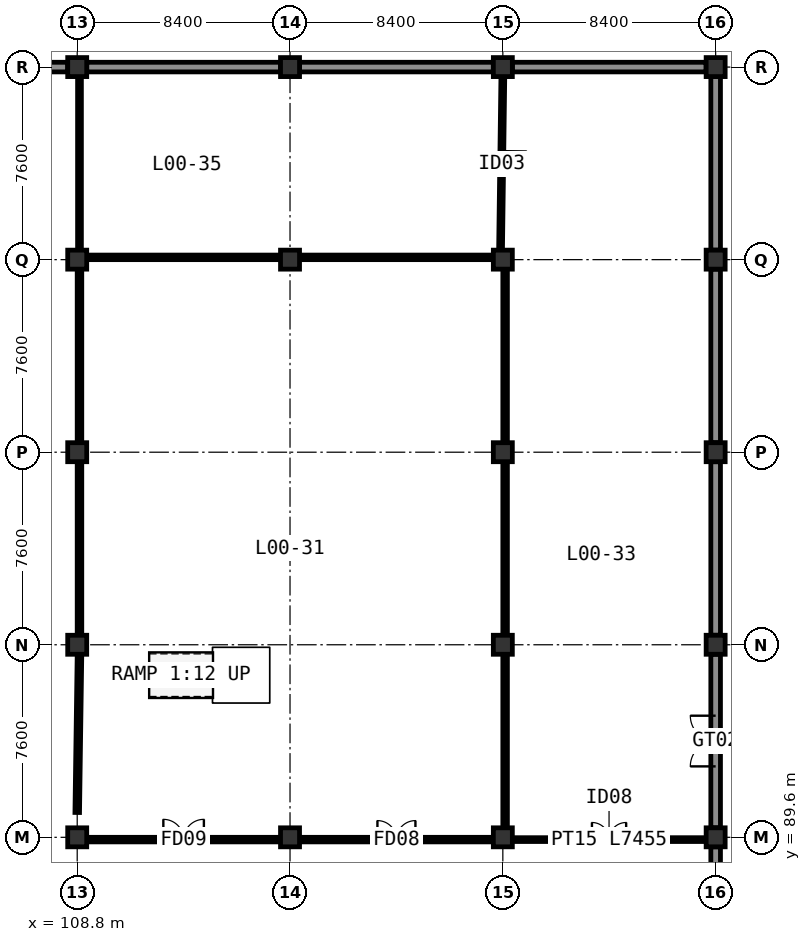
"""IFC4 building model, lengths in metres.
Left out: names, types, materials, properties, quantities, classifications, styles, units other than length and angle.
Written with IfcOpenShell. Run it as: python <this file> out.ifc"""

import sys

from ifc_helpers import new_model, si_unit, direction, frame, frame_2d, origin, origin_2d, place, context, subcontext, project, spatial, rectangle, extrude, element, fill, save


model = new_model("IFC4")
c1 = context("Model", 3, precision=1e-05, world=origin(), true_north=direction((0.0, 1.0)))
c2 = subcontext(c1, "Body", "Model", "MODEL_VIEW")
j1 = project(units=[si_unit("LENGTHUNIT", "METRE"), si_unit("PLANEANGLEUNIT", "RADIAN")], contexts=[c1])
p1 = place(None, origin())
s1 = spatial("IfcSite", under=j1, at=p1, CompositionType="ELEMENT")
p2 = place(p1, origin())
s2 = spatial("IfcBuilding", under=s1, at=p2, CompositionType="ELEMENT")
p3 = place(p2, origin())
s3 = spatial("IfcBuildingStorey", under=s2, at=p3, CompositionType="ELEMENT", Elevation=0.0)
for number, where, z_axis, x_axis in (
    (1, (108.8, 89.6, 0.0), (0.0, 0.0, 1.0), (1.0, 0.0, 0.0)),
    (2, (117.2, 89.6, 0.0), (0.0, 0.0, 1.0), (1.0, 0.0, 0.0)),
    (3, (125.6, 89.6, 0.0), (0.0, 0.0, 1.0), (1.0, 0.0, 0.0)),
    (4, (134.0, 89.6, 0.0), (0.0, 0.0, 1.0), (1.0, 0.0, 0.0)),
    (5, (108.8, 97.2, 0.0), (0.0, 0.0, 1.0), (1.0, 0.0, 0.0)),
    (6, (125.6, 97.2, 0.0), (0.0, 0.0, 1.0), (1.0, 0.0, 0.0)),
    (7, (134.0, 97.2, 0.0), (0.0, 0.0, 1.0), (1.0, 0.0, 0.0)),
    (8, (108.8, 104.8, 0.0), (0.0, 0.0, 1.0), (1.0, 0.0, 0.0)),
    (9, (125.6, 104.8, 0.0), (0.0, 0.0, 1.0), (1.0, 0.0, 0.0)),
    (10, (134.0, 104.8, 0.0), (0.0, 0.0, 1.0), (1.0, 0.0, 0.0)),
    (11, (108.8, 112.4, 0.0), (0.0, 0.0, 1.0), (1.0, 0.0, 0.0)),
    (12, (117.2, 112.4, 0.0), (0.0, 0.0, 1.0), (1.0, 0.0, 0.0)),
    (13, (125.6, 112.4, 0.0), (0.0, 0.0, 1.0), (1.0, 0.0, 0.0)),
    (14, (134.0, 112.4, 0.0), (0.0, 0.0, 1.0), (1.0, 0.0, 0.0)),
    (15, (108.8, 120.0, 0.0), (0.0, 0.0, 1.0), (1.0, 0.0, 0.0)),
    (16, (117.2, 120.0, 0.0), (0.0, 0.0, 1.0), (1.0, 0.0, 0.0)),
    (17, (125.6, 120.0, 0.0), (0.0, 0.0, 1.0), (1.0, 0.0, 0.0)),
    (18, (134.0, 120.0, 0.0), (0.0, 0.0, 1.0), (1.0, 0.0, 0.0)),
):
    element("IfcColumn", number, at=place(p3, frame(where, z_axis=z_axis, x_axis=x_axis)), inside=s3, PredefinedType="COLUMN", context=c2, shape_type="SweptSolid", body=[
        extrude(rectangle(XDim=0.75, YDim=0.75, at=origin_2d()), origin(), (0.0, 0.0, 1.0), 4.8),
    ])
p4 = place(p3, frame((134.0, 82.375, 0.0), z_axis=(0.0, 0.0, 1.0), x_axis=(0.0, 1.0, 0.0)))
e19 = element("IfcWall", 19, at=p4, inside=s3, PredefinedType="SOLIDWALL", context=c2, shape_type="SweptSolid", body=[
    extrude(rectangle(XDim=6.85, YDim=0.38, at=frame_2d((3.425, 0.0))), origin(), (0.0, 0.0, 1.0), 3.95),
])
p5 = place(p3, frame((134.0, 89.975, 0.0), z_axis=(0.0, 0.0, 1.0), x_axis=(0.0, 1.0, 0.0)))
e20 = element("IfcWall", 20, at=p5, inside=s3, PredefinedType="SOLIDWALL", context=c2, shape_type="SweptSolid", body=[
    extrude(rectangle(XDim=6.85, YDim=0.38, at=frame_2d((3.425, 0.0))), origin(), (0.0, 0.0, 1.0), 3.95),
])
p6 = place(p5, frame((2.425, 0.0, 0.0)))
e21 = element("IfcOpeningElement", 21, at=p6, cuts=e20, PredefinedType="OPENING", context=c2, shape_type="SweptSolid", body=[
    extrude(rectangle(XDim=2.0, YDim=2.1, at=frame_2d((1.0, 1.05))), frame((0.0, 0.2, 0.0), z_axis=(0.0, -1.0, 0.0), x_axis=(1.0, 0.0, 0.0)), (0.0, 0.0, 1.0), 0.4),
])
p7 = place(p3, frame((134.0, 97.575, 0.0), z_axis=(0.0, 0.0, 1.0), x_axis=(0.0, 1.0, 0.0)))
e22 = element("IfcWall", 22, at=p7, inside=s3, PredefinedType="SOLIDWALL", context=c2, shape_type="SweptSolid", body=[
    extrude(rectangle(XDim=6.85, YDim=0.38, at=frame_2d((3.425, 0.0))), origin(), (0.0, 0.0, 1.0), 3.95),
])
p8 = place(p3, frame((134.0, 105.175, 0.0), z_axis=(0.0, 0.0, 1.0), x_axis=(0.0, 1.0, 0.0)))
e23 = element("IfcWall", 23, at=p8, inside=s3, PredefinedType="SOLIDWALL", context=c2, shape_type="SweptSolid", body=[
    extrude(rectangle(XDim=6.85, YDim=0.38, at=frame_2d((3.425, 0.0))), origin(), (0.0, 0.0, 1.0), 3.95),
])
p9 = place(p3, frame((134.0, 112.775, 0.0), z_axis=(0.0, 0.0, 1.0), x_axis=(0.0, 1.0, 0.0)))
e24 = element("IfcWall", 24, at=p9, inside=s3, PredefinedType="SOLIDWALL", context=c2, shape_type="SweptSolid", body=[
    extrude(rectangle(XDim=6.85, YDim=0.38, at=frame_2d((3.425, 0.0))), origin(), (0.0, 0.0, 1.0), 3.95),
])
p10 = place(p3, frame((133.625, 120.0, 0.0), z_axis=(0.0, 0.0, 1.0), x_axis=(-1.0, 0.0, 0.0)))
e25 = element("IfcWall", 25, at=p10, inside=s3, PredefinedType="SOLIDWALL", context=c2, shape_type="SweptSolid", body=[
    extrude(rectangle(XDim=7.65, YDim=0.38, at=frame_2d((3.825, 0.0))), origin(), (0.0, 0.0, 1.0), 4.187),
])
p11 = place(p3, frame((125.225, 120.0, 0.0), z_axis=(0.0, 0.0, 1.0), x_axis=(-1.0, 0.0, 0.0)))
e26 = element("IfcWall", 26, at=p11, inside=s3, PredefinedType="SOLIDWALL", context=c2, shape_type="SweptSolid", body=[
    extrude(rectangle(XDim=7.65, YDim=0.38, at=frame_2d((3.825, 0.0))), origin(), (0.0, 0.0, 1.0), 4.187),
])
p12 = place(p3, frame((116.825, 120.0, 0.0), z_axis=(0.0, 0.0, 1.0), x_axis=(-1.0, 0.0, 0.0)))
e27 = element("IfcWall", 27, at=p12, inside=s3, PredefinedType="SOLIDWALL", context=c2, shape_type="SweptSolid", body=[
    extrude(rectangle(XDim=7.65, YDim=0.38, at=frame_2d((3.825, 0.0))), origin(), (0.0, 0.0, 1.0), 4.187),
])
p13 = place(p3, frame((108.425, 120.0, 0.0), z_axis=(0.0, 0.0, 1.0), x_axis=(-1.0, 0.0, 0.0)))
e28 = element("IfcWall", 28, at=p13, inside=s3, PredefinedType="SOLIDWALL", context=c2, shape_type="SweptSolid", body=[
    extrude(rectangle(XDim=7.65, YDim=0.38, at=frame_2d((3.825, 0.0))), origin(), (0.0, 0.0, 1.0), 4.187),
])
p14 = place(p13, frame((2.725, 0.0, 0.0)))
e29 = element("IfcOpeningElement", 29, at=p14, cuts=e28, PredefinedType="OPENING", context=c2, shape_type="SweptSolid", body=[
    extrude(rectangle(XDim=2.2, YDim=2.4, at=frame_2d((1.1, 1.2))), frame((0.0, 0.2, 0.0), z_axis=(0.0, -1.0, 0.0), x_axis=(1.0, 0.0, 0.0)), (0.0, 0.0, 1.0), 0.4),
])
p15 = place(p3, frame((126.065, 89.51, 0.0), z_axis=(0.0, 0.0, 1.0), x_axis=(1.0, 0.0, 0.0)))
e30 = element("IfcWall", 30, at=p15, inside=s3, PredefinedType="PARTITIONING", context=c2, shape_type="SweptSolid", body=[
    extrude(rectangle(XDim=7.455, YDim=0.15, at=frame_2d((3.728, 0.0))), origin(), (0.0, 0.0, 1.0), 3.95),
])
p16 = place(p15, frame((3.052, 0.0, 0.0)))
e31 = element("IfcOpeningElement", 31, at=p16, cuts=e30, PredefinedType="OPENING", context=c2, shape_type="SweptSolid", body=[
    extrude(rectangle(XDim=1.35, YDim=2.18, at=frame_2d((0.675, 1.09))), frame((0.0, 0.085, 0.0), z_axis=(0.0, -1.0, 0.0), x_axis=(1.0, 0.0, 0.0)), (0.0, 0.0, 1.0), 0.17),
])
p17 = place(p3, frame((117.665, 89.51, 0.0), z_axis=(0.0, 0.0, 1.0), x_axis=(1.0, 0.0, 0.0)))
e32 = element("IfcWall", 32, at=p17, inside=s3, PredefinedType="PARTITIONING", context=c2, shape_type="SweptSolid", body=[
    extrude(rectangle(XDim=7.47, YDim=0.18, at=frame_2d((3.735, 0.0))), origin(), (0.0, 0.0, 1.0), 4.187),
])
p18 = place(p17, frame((2.985, 0.0, 0.0)))
e33 = element("IfcOpeningElement", 33, at=p18, cuts=e32, PredefinedType="OPENING", context=c2, shape_type="SweptSolid", body=[
    extrude(rectangle(XDim=1.5, YDim=2.15, at=frame_2d((0.75, 1.075))), frame((0.0, 0.1, 0.0), z_axis=(0.0, -1.0, 0.0), x_axis=(1.0, 0.0, 0.0)), (0.0, 0.0, 1.0), 0.2),
])
p19 = place(p3, frame((109.265, 89.51, 0.0), z_axis=(0.0, 0.0, 1.0), x_axis=(1.0, 0.0, 0.0)))
e34 = element("IfcWall", 34, at=p19, inside=s3, PredefinedType="PARTITIONING", context=c2, shape_type="SweptSolid", body=[
    extrude(rectangle(XDim=7.47, YDim=0.18, at=frame_2d((3.735, 0.0))), origin(), (0.0, 0.0, 1.0), 4.187),
])
p20 = place(p19, frame((2.935, 0.0, 0.0)))
e35 = element("IfcOpeningElement", 35, at=p20, cuts=e34, PredefinedType="OPENING", context=c2, shape_type="SweptSolid", body=[
    extrude(rectangle(XDim=1.6, YDim=2.2, at=frame_2d((0.8, 1.1))), frame((0.0, 0.1, 0.0), z_axis=(0.0, -1.0, 0.0), x_axis=(1.0, 0.0, 0.0)), (0.0, 0.0, 1.0), 0.2),
])
p21 = place(p3, frame((125.599, 119.52, 0.0), z_axis=(0.0, 0.0, 1.0), x_axis=(-0.013205495774, -0.999912803639, 0.0)))
e36 = element("IfcWall", 36, at=p21, inside=s3, PredefinedType="PARTITIONING", context=c2, shape_type="SweptSolid", body=[
    extrude(rectangle(XDim=6.656, YDim=0.15, at=frame_2d((3.328, 0.0))), origin(), (0.0, 0.0, 1.0), 3.95),
])
p22 = place(p21, frame((2.838, 0.0, 0.0)))
e37 = element("IfcOpeningElement", 37, at=p22, cuts=e36, PredefinedType="OPENING", context=c2, shape_type="SweptSolid", body=[
    extrude(rectangle(XDim=0.98, YDim=2.08, at=frame_2d((0.49, 1.04))), frame((0.0, 0.085, 0.0), z_axis=(0.0, -1.0, 0.0), x_axis=(1.0, 0.0, 0.0)), (0.0, 0.0, 1.0), 0.17),
])
p23 = place(p3, frame((125.135, 112.49, 0.0), z_axis=(0.0, 0.0, 1.0), x_axis=(-1.0, 0.0, 0.0)))
e38 = element("IfcWall", 38, at=p23, inside=s3, PredefinedType="PARTITIONING", context=c2, shape_type="SweptSolid", body=[
    extrude(rectangle(XDim=7.47, YDim=0.18, at=frame_2d((3.735, 0.0))), origin(), (0.0, 0.0, 1.0), 4.187),
])
p24 = place(p3, frame((116.735, 112.49, 0.0), z_axis=(0.0, 0.0, 1.0), x_axis=(-1.0, 0.0, 0.0)))
e39 = element("IfcWall", 39, at=p24, inside=s3, PredefinedType="PARTITIONING", context=c2, shape_type="SweptSolid", body=[
    extrude(rectangle(XDim=7.47, YDim=0.18, at=frame_2d((3.735, 0.0))), origin(), (0.0, 0.0, 1.0), 4.187),
])
p25 = place(p3, frame((108.89, 112.865, 0.0), z_axis=(0.0, 0.0, 1.0), x_axis=(0.0, 1.0, 0.0)))
e40 = element("IfcWall", 40, at=p25, inside=s3, PredefinedType="PARTITIONING", context=c2, shape_type="SweptSolid", body=[
    extrude(rectangle(XDim=6.655, YDim=0.15, at=frame_2d((3.328, 0.0))), origin(), (0.0, 0.0, 1.0), 3.95),
])
p26 = place(p3, frame((125.69, 97.665, 0.0), z_axis=(0.0, 0.0, 1.0), x_axis=(0.0, 1.0, 0.0)))
e41 = element("IfcWall", 41, at=p26, inside=s3, PredefinedType="PARTITIONING", context=c2, shape_type="SweptSolid", body=[
    extrude(rectangle(XDim=6.67, YDim=0.18, at=frame_2d((3.335, 0.0))), origin(), (0.0, 0.0, 1.0), 3.95),
])
for number, where, z_axis, x_axis in (
    (42, (125.69, 105.265, 0.0), (0.0, 0.0, 1.0), (0.0, 1.0, 0.0)),
    (43, (125.69, 90.065, 0.0), (0.0, 0.0, 1.0), (0.0, 1.0, 0.0)),
):
    element("IfcWall", number, at=place(p3, frame(where, z_axis=z_axis, x_axis=x_axis)), inside=s3, PredefinedType="PARTITIONING", context=c2, shape_type="SweptSolid", body=[
        extrude(rectangle(XDim=6.67, YDim=0.18, at=frame_2d((3.335, 0.0))), origin(), (0.0, 0.0, 1.0), 3.95),
    ])
p27 = place(p3, frame((108.89, 97.665, 0.0), z_axis=(0.0, 0.0, 1.0), x_axis=(0.0, 1.0, 0.0)))
e44 = element("IfcWall", 44, at=p27, inside=s3, PredefinedType="PARTITIONING", context=c2, shape_type="SweptSolid", body=[
    extrude(rectangle(XDim=6.67, YDim=0.18, at=frame_2d((3.335, 0.0))), origin(), (0.0, 0.0, 1.0), 3.95),
])
p28 = place(p3, frame((108.89, 105.265, 0.0), z_axis=(0.0, 0.0, 1.0), x_axis=(0.0, 1.0, 0.0)))
e45 = element("IfcWall", 45, at=p28, inside=s3, PredefinedType="PARTITIONING", context=c2, shape_type="SweptSolid", body=[
    extrude(rectangle(XDim=6.67, YDim=0.18, at=frame_2d((3.335, 0.0))), origin(), (0.0, 0.0, 1.0), 3.95),
])
p29 = place(p3, frame((108.801, 90.581, 0.0), z_axis=(0.0, 0.0, 1.0), x_axis=(0.014279158124, 0.999898047624, 0.0)))
e46 = element("IfcWall", 46, at=p29, inside=s3, PredefinedType="PARTITIONING", context=c2, shape_type="SweptSolid", body=[
    extrude(rectangle(XDim=6.155, YDim=0.18, at=frame_2d((3.078, 0.0))), origin(), (0.0, 0.0, 1.0), 3.95),
])
p30 = place(p6, frame((2.0, 0.0, 0.0), z_axis=(0.0, 0.0, 1.0), x_axis=(-1.0, 0.0, 0.0)))
e47 = element("IfcDoor", 47, at=p30, inside=s3, OperationType="DOUBLE_DOOR_SINGLE_SWING", PredefinedType="GATE", context=c2, shape_type="SweptSolid", body=[
    extrude(rectangle(XDim=2.0, YDim=2.1, at=frame_2d((1.0, 1.05))), frame((0.0, 0.025, 0.0), z_axis=(0.0, -1.0, 0.0), x_axis=(1.0, 0.0, 0.0)), (0.0, 0.0, 1.0), 0.05),
])
fill(e21, e47)
p31 = place(p16, origin())
e48 = element("IfcDoor", 48, at=p31, inside=s3, OperationType="DOUBLE_DOOR_SINGLE_SWING", PredefinedType="DOOR", context=c2, shape_type="SweptSolid", body=[
    extrude(rectangle(XDim=1.35, YDim=2.18, at=frame_2d((0.675, 1.09))), frame((0.0, 0.025, 0.0), z_axis=(0.0, -1.0, 0.0), x_axis=(1.0, 0.0, 0.0)), (0.0, 0.0, 1.0), 0.05),
])
fill(e31, e48)
p32 = place(p18, origin())
e49 = element("IfcDoor", 49, at=p32, inside=s3, OperationType="DOUBLE_DOOR_SINGLE_SWING", PredefinedType="DOOR", context=c2, shape_type="SweptSolid", body=[
    extrude(rectangle(XDim=1.5, YDim=2.15, at=frame_2d((0.75, 1.075))), frame((0.0, 0.025, 0.0), z_axis=(0.0, -1.0, 0.0), x_axis=(1.0, 0.0, 0.0)), (0.0, 0.0, 1.0), 0.05),
])
fill(e33, e49)
p33 = place(p20, origin())
e50 = element("IfcDoor", 50, at=p33, inside=s3, OperationType="DOUBLE_DOOR_SINGLE_SWING", PredefinedType="DOOR", context=c2, shape_type="SweptSolid", body=[
    extrude(rectangle(XDim=1.6, YDim=2.2, at=frame_2d((0.8, 1.1))), frame((0.0, 0.025, 0.0), z_axis=(0.0, -1.0, 0.0), x_axis=(1.0, 0.0, 0.0)), (0.0, 0.0, 1.0), 0.05),
])
fill(e35, e50)
p34 = place(p22, origin())
e51 = element("IfcDoor", 51, at=p34, inside=s3, OperationType="SINGLE_SWING_LEFT", PredefinedType="DOOR", context=c2, shape_type="SweptSolid", body=[
    extrude(rectangle(XDim=0.98, YDim=2.08, at=frame_2d((0.49, 1.04))), frame((0.0, 0.025, 0.0), z_axis=(0.0, -1.0, 0.0), x_axis=(1.0, 0.0, 0.0)), (0.0, 0.0, 1.0), 0.05),
])
fill(e37, e51)
save(model, sys.argv[1])
